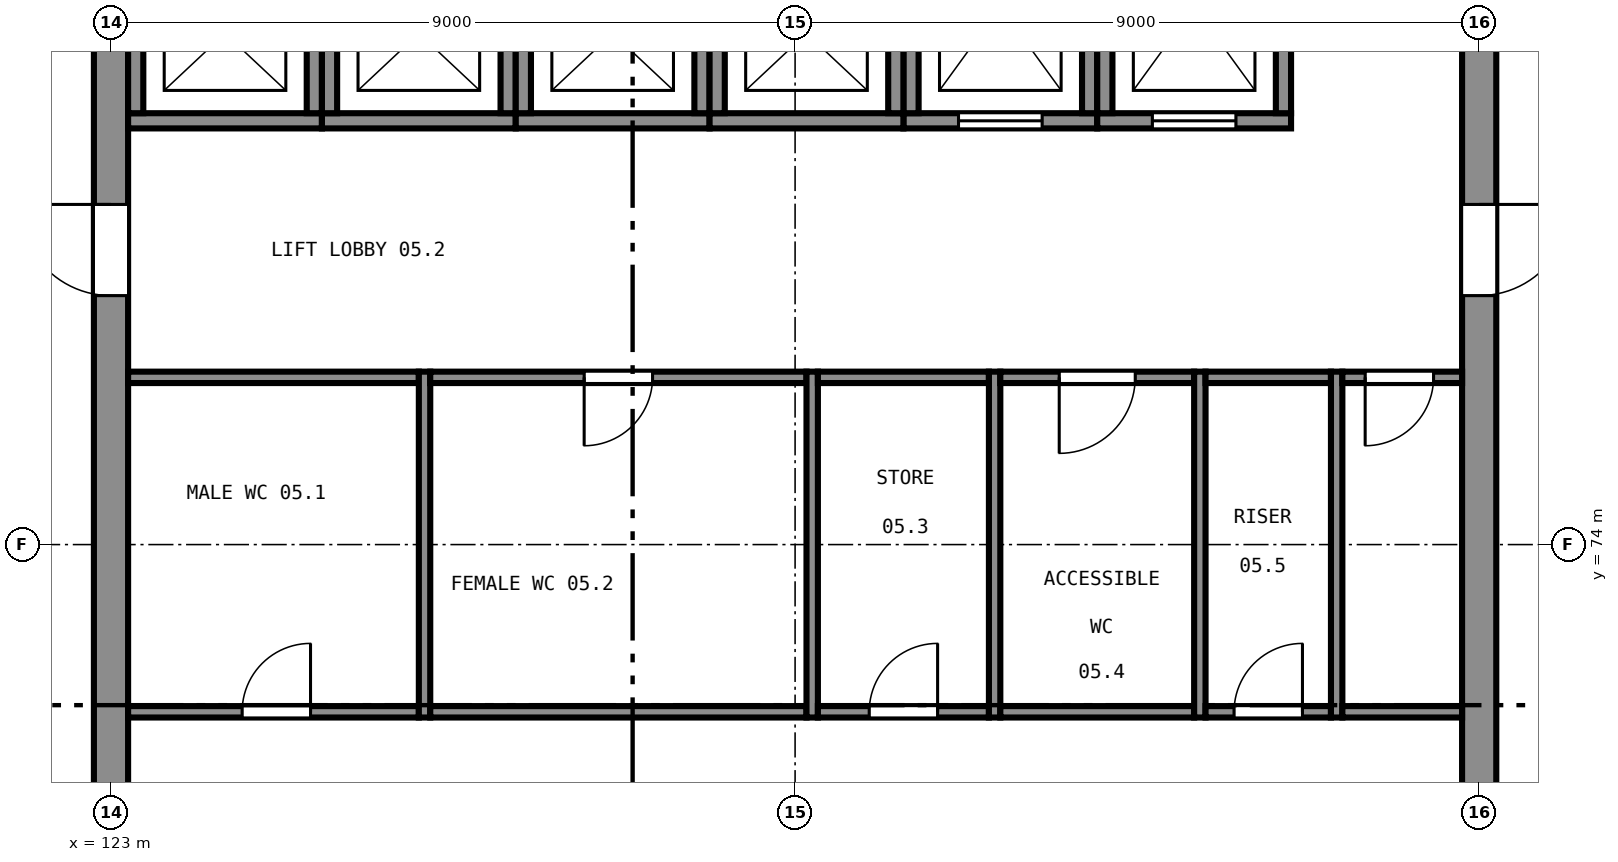
"""IFC4 building model, lengths in metres.
Left out: names, types, materials, properties, quantities, classifications, styles, units other than length and angle.
Written with IfcOpenShell. Run it as: python <this file> out.ifc"""

import sys

from ifc_helpers import new_model, si_unit, direction, frame, frame_2d, origin, place, context, subcontext, project, spatial, rectangle, extrude, element, fill, save


model = new_model("IFC4")
c1 = context("Model", 3, precision=1e-05, world=origin(), true_north=direction((0.0, 1.0)))
c2 = subcontext(c1, "Body", "Model", "MODEL_VIEW")
j1 = project(units=[si_unit("LENGTHUNIT", "METRE"), si_unit("PLANEANGLEUNIT", "RADIAN")], contexts=[c1])
p1 = place(None, origin())
s1 = spatial("IfcSite", under=j1, at=p1, CompositionType="ELEMENT")
p2 = place(p1, origin())
s2 = spatial("IfcBuilding", under=s1, at=p2, CompositionType="ELEMENT")
p3 = place(p2, frame((0.0, 0.0, 21.5)))
s3 = spatial("IfcBuildingStorey", under=s2, at=p3, CompositionType="ELEMENT", Elevation=21.5)
p4 = place(p3, frame((141.0, 65.225, 0.0), z_axis=(0.0, 0.0, 1.0), x_axis=(0.0, 1.0, 0.0)))
e1 = element("IfcWall", 1, at=p4, inside=s3, PredefinedType="SHEAR", context=c2, shape_type="SweptSolid", body=[
    extrude(rectangle(XDim=17.55, YDim=0.45, at=frame_2d((8.775, 0.0))), origin(), (0.0, 0.0, 1.0), 4.0),
])
p5 = place(p4, frame((4.3, 0.0, 0.0)))
e2 = element("IfcOpeningElement", 2, at=p5, cuts=e1, PredefinedType="OPENING", context=c2, shape_type="SweptSolid", body=[
    extrude(rectangle(XDim=1.2, YDim=2.1, at=frame_2d((0.6, 1.05))), frame((0.0, 0.235, 0.0), z_axis=(0.0, -1.0, 0.0), x_axis=(1.0, 0.0, 0.0)), (0.0, 0.0, 1.0), 0.47),
])
p6 = place(p4, frame((12.05, 0.0, 0.0)))
e3 = element("IfcOpeningElement", 3, at=p6, cuts=e1, PredefinedType="OPENING", context=c2, shape_type="SweptSolid", body=[
    extrude(rectangle(XDim=1.2, YDim=2.1, at=frame_2d((0.6, 1.05))), frame((0.0, 0.235, 0.0), z_axis=(0.0, -1.0, 0.0), x_axis=(1.0, 0.0, 0.0)), (0.0, 0.0, 1.0), 0.47),
])
p7 = place(p3, frame((123.0, 82.775, 0.0), z_axis=(0.0, 0.0, 1.0), x_axis=(0.0, -1.0, 0.0)))
e4 = element("IfcWall", 4, at=p7, inside=s3, PredefinedType="SHEAR", context=c2, shape_type="SweptSolid", body=[
    extrude(rectangle(XDim=17.55, YDim=0.45, at=frame_2d((8.775, 0.0))), origin(), (0.0, 0.0, 1.0), 4.0),
])
p8 = place(p7, frame((12.05, 0.0, 0.0)))
e5 = element("IfcOpeningElement", 5, at=p8, cuts=e4, PredefinedType="OPENING", context=c2, shape_type="SweptSolid", body=[
    extrude(rectangle(XDim=1.2, YDim=2.1, at=frame_2d((0.6, 1.05))), frame((0.0, 0.235, 0.0), z_axis=(0.0, -1.0, 0.0), x_axis=(1.0, 0.0, 0.0)), (0.0, 0.0, 1.0), 0.47),
])
p9 = place(p7, frame((4.3, 0.0, 0.0)))
e6 = element("IfcOpeningElement", 6, at=p9, cuts=e4, PredefinedType="OPENING", context=c2, shape_type="SweptSolid", body=[
    extrude(rectangle(XDim=1.2, YDim=2.1, at=frame_2d((0.6, 1.05))), frame((0.0, 0.235, 0.0), z_axis=(0.0, -1.0, 0.0), x_axis=(1.0, 0.0, 0.0)), (0.0, 0.0, 1.0), 0.47),
])
p10 = place(p3, frame((123.225, 79.575, 0.0), z_axis=(0.0, 0.0, 1.0), x_axis=(1.0, 0.0, 0.0)))
e7 = element("IfcWall", 7, at=p10, inside=s3, PredefinedType="SHEAR", context=c2, shape_type="SweptSolid", body=[
    extrude(rectangle(XDim=2.55, YDim=0.2, at=frame_2d((1.275, 0.0))), origin(), (0.0, 0.0, 1.0), 4.0),
])
for number, where, z_axis, x_axis in (
    (8, (125.675, 79.675, 0.0), (0.0, 0.0, 1.0), (0.0, 1.0, 0.0)),
    (9, (123.325, 81.775, 0.0), (0.0, 0.0, 1.0), (0.0, -1.0, 0.0)),
):
    element("IfcWall", number, at=place(p3, frame(where, z_axis=z_axis, x_axis=x_axis)), inside=s3, PredefinedType="SHEAR", context=c2, shape_type="SweptSolid", body=[
        extrude(rectangle(XDim=2.1, YDim=0.2, at=frame_2d((1.05, 0.0))), origin(), (0.0, 0.0, 1.0), 4.0),
    ])
p11 = place(p3, frame((125.775, 79.575, 0.0), z_axis=(0.0, 0.0, 1.0), x_axis=(1.0, 0.0, 0.0)))
e10 = element("IfcWall", 10, at=p11, inside=s3, PredefinedType="SHEAR", context=c2, shape_type="SweptSolid", body=[
    extrude(rectangle(XDim=2.55, YDim=0.2, at=frame_2d((1.275, 0.0))), origin(), (0.0, 0.0, 1.0), 4.0),
])
for number, where, z_axis, x_axis in (
    (11, (128.225, 79.675, 0.0), (0.0, 0.0, 1.0), (0.0, 1.0, 0.0)),
    (12, (125.875, 81.775, 0.0), (0.0, 0.0, 1.0), (0.0, -1.0, 0.0)),
):
    element("IfcWall", number, at=place(p3, frame(where, z_axis=z_axis, x_axis=x_axis)), inside=s3, PredefinedType="SHEAR", context=c2, shape_type="SweptSolid", body=[
        extrude(rectangle(XDim=2.1, YDim=0.2, at=frame_2d((1.05, 0.0))), origin(), (0.0, 0.0, 1.0), 4.0),
    ])
p12 = place(p3, frame((128.325, 79.575, 0.0), z_axis=(0.0, 0.0, 1.0), x_axis=(1.0, 0.0, 0.0)))
e13 = element("IfcWall", 13, at=p12, inside=s3, PredefinedType="SHEAR", context=c2, shape_type="SweptSolid", body=[
    extrude(rectangle(XDim=2.55, YDim=0.2, at=frame_2d((1.275, 0.0))), origin(), (0.0, 0.0, 1.0), 4.0),
])
for number, where, z_axis, x_axis in (
    (14, (130.775, 79.675, 0.0), (0.0, 0.0, 1.0), (0.0, 1.0, 0.0)),
    (15, (128.425, 81.775, 0.0), (0.0, 0.0, 1.0), (0.0, -1.0, 0.0)),
):
    element("IfcWall", number, at=place(p3, frame(where, z_axis=z_axis, x_axis=x_axis)), inside=s3, PredefinedType="SHEAR", context=c2, shape_type="SweptSolid", body=[
        extrude(rectangle(XDim=2.1, YDim=0.2, at=frame_2d((1.05, 0.0))), origin(), (0.0, 0.0, 1.0), 4.0),
    ])
p13 = place(p3, frame((130.875, 79.575, 0.0), z_axis=(0.0, 0.0, 1.0), x_axis=(1.0, 0.0, 0.0)))
e16 = element("IfcWall", 16, at=p13, inside=s3, PredefinedType="SHEAR", context=c2, shape_type="SweptSolid", body=[
    extrude(rectangle(XDim=2.55, YDim=0.2, at=frame_2d((1.275, 0.0))), origin(), (0.0, 0.0, 1.0), 4.0),
])
for number, where, z_axis, x_axis in (
    (17, (133.325, 79.675, 0.0), (0.0, 0.0, 1.0), (0.0, 1.0, 0.0)),
    (18, (130.975, 81.775, 0.0), (0.0, 0.0, 1.0), (0.0, -1.0, 0.0)),
):
    element("IfcWall", number, at=place(p3, frame(where, z_axis=z_axis, x_axis=x_axis)), inside=s3, PredefinedType="SHEAR", context=c2, shape_type="SweptSolid", body=[
        extrude(rectangle(XDim=2.1, YDim=0.2, at=frame_2d((1.05, 0.0))), origin(), (0.0, 0.0, 1.0), 4.0),
    ])
p14 = place(p3, frame((133.425, 79.575, 0.0), z_axis=(0.0, 0.0, 1.0), x_axis=(1.0, 0.0, 0.0)))
e19 = element("IfcWall", 19, at=p14, inside=s3, PredefinedType="SHEAR", context=c2, shape_type="SweptSolid", body=[
    extrude(rectangle(XDim=2.55, YDim=0.2, at=frame_2d((1.275, 0.0))), origin(), (0.0, 0.0, 1.0), 4.0),
])
p15 = place(p14, frame((0.725, 0.0, 0.0)))
e20 = element("IfcOpeningElement", 20, at=p15, cuts=e19, PredefinedType="OPENING", context=c2, shape_type="SweptSolid", body=[
    extrude(rectangle(XDim=1.1, YDim=2.1, at=frame_2d((0.55, 1.05))), frame((0.0, 0.11, 0.0), z_axis=(0.0, -1.0, 0.0), x_axis=(1.0, 0.0, 0.0)), (0.0, 0.0, 1.0), 0.22),
])
for number, where, z_axis, x_axis in (
    (21, (135.875, 79.675, 0.0), (0.0, 0.0, 1.0), (0.0, 1.0, 0.0)),
    (22, (133.525, 82.475, 0.0), (0.0, 0.0, 1.0), (0.0, -1.0, 0.0)),
):
    element("IfcWall", number, at=place(p3, frame(where, z_axis=z_axis, x_axis=x_axis)), inside=s3, PredefinedType="SHEAR", context=c2, shape_type="SweptSolid", body=[
        extrude(rectangle(XDim=2.8, YDim=0.2, at=frame_2d((1.4, 0.0))), origin(), (0.0, 0.0, 1.0), 4.0),
    ])
p16 = place(p3, frame((135.975, 79.575, 0.0), z_axis=(0.0, 0.0, 1.0), x_axis=(1.0, 0.0, 0.0)))
e23 = element("IfcWall", 23, at=p16, inside=s3, PredefinedType="SHEAR", context=c2, shape_type="SweptSolid", body=[
    extrude(rectangle(XDim=2.55, YDim=0.2, at=frame_2d((1.275, 0.0))), origin(), (0.0, 0.0, 1.0), 4.0),
])
p17 = place(p16, frame((0.725, 0.0, 0.0)))
e24 = element("IfcOpeningElement", 24, at=p17, cuts=e23, PredefinedType="OPENING", context=c2, shape_type="SweptSolid", body=[
    extrude(rectangle(XDim=1.1, YDim=2.1, at=frame_2d((0.55, 1.05))), frame((0.0, 0.11, 0.0), z_axis=(0.0, -1.0, 0.0), x_axis=(1.0, 0.0, 0.0)), (0.0, 0.0, 1.0), 0.22),
])
for number, where, z_axis, x_axis in (
    (25, (138.425, 79.675, 0.0), (0.0, 0.0, 1.0), (0.0, 1.0, 0.0)),
    (26, (136.075, 82.475, 0.0), (0.0, 0.0, 1.0), (0.0, -1.0, 0.0)),
):
    element("IfcWall", number, at=place(p3, frame(where, z_axis=z_axis, x_axis=x_axis)), inside=s3, PredefinedType="SHEAR", context=c2, shape_type="SweptSolid", body=[
        extrude(rectangle(XDim=2.8, YDim=0.2, at=frame_2d((1.4, 0.0))), origin(), (0.0, 0.0, 1.0), 4.0),
    ])
p18 = place(p3, frame((127.125, 71.725, 0.0), z_axis=(0.0, 0.0, 1.0), x_axis=(0.0, 1.0, 0.0)))
e27 = element("IfcWall", 27, at=p18, inside=s3, PredefinedType="PARTITIONING", context=c2, shape_type="SweptSolid", body=[
    extrude(rectangle(XDim=4.55, YDim=0.15, at=frame_2d((2.275, 0.0))), origin(), (0.0, 0.0, 1.0), 3.75),
])
p19 = place(p3, frame((123.225, 71.8, 0.0), z_axis=(0.0, 0.0, 1.0), x_axis=(1.0, 0.0, 0.0)))
e28 = element("IfcWall", 28, at=p19, inside=s3, PredefinedType="PARTITIONING", context=c2, shape_type="SweptSolid", body=[
    extrude(rectangle(XDim=3.825, YDim=0.15, at=frame_2d((1.913, 0.0))), origin(), (0.0, 0.0, 1.0), 3.75),
])
p20 = place(p19, frame((1.5, 0.0, 0.0)))
e29 = element("IfcOpeningElement", 29, at=p20, cuts=e28, PredefinedType="OPENING", context=c2, shape_type="SweptSolid", body=[
    extrude(rectangle(XDim=0.9, YDim=2.1, at=frame_2d((0.45, 1.05))), frame((0.0, 0.085, 0.0), z_axis=(0.0, -1.0, 0.0), x_axis=(1.0, 0.0, 0.0)), (0.0, 0.0, 1.0), 0.17),
])
p21 = place(p3, frame((123.225, 76.2, 0.0), z_axis=(0.0, 0.0, 1.0), x_axis=(1.0, 0.0, 0.0)))
e30 = element("IfcWall", 30, at=p21, inside=s3, PredefinedType="PARTITIONING", context=c2, shape_type="SweptSolid", body=[
    extrude(rectangle(XDim=3.825, YDim=0.15, at=frame_2d((1.913, 0.0))), origin(), (0.0, 0.0, 1.0), 3.75),
])
p22 = place(p3, frame((132.225, 71.725, 0.0), z_axis=(0.0, 0.0, 1.0), x_axis=(0.0, 1.0, 0.0)))
e31 = element("IfcWall", 31, at=p22, inside=s3, PredefinedType="PARTITIONING", context=c2, shape_type="SweptSolid", body=[
    extrude(rectangle(XDim=4.55, YDim=0.15, at=frame_2d((2.275, 0.0))), origin(), (0.0, 0.0, 1.0), 3.75),
])
p23 = place(p3, frame((127.2, 71.8, 0.0), z_axis=(0.0, 0.0, 1.0), x_axis=(1.0, 0.0, 0.0)))
e32 = element("IfcWall", 32, at=p23, inside=s3, PredefinedType="PARTITIONING", context=c2, shape_type="SweptSolid", body=[
    extrude(rectangle(XDim=4.95, YDim=0.15, at=frame_2d((2.475, 0.0))), origin(), (0.0, 0.0, 1.0), 3.75),
])
p24 = place(p3, frame((127.2, 76.2, 0.0), z_axis=(0.0, 0.0, 1.0), x_axis=(1.0, 0.0, 0.0)))
e33 = element("IfcWall", 33, at=p24, inside=s3, PredefinedType="PARTITIONING", context=c2, shape_type="SweptSolid", body=[
    extrude(rectangle(XDim=4.95, YDim=0.15, at=frame_2d((2.475, 0.0))), origin(), (0.0, 0.0, 1.0), 3.75),
])
p25 = place(p24, frame((2.025, 0.0, 0.0)))
e34 = element("IfcOpeningElement", 34, at=p25, cuts=e33, PredefinedType="OPENING", context=c2, shape_type="SweptSolid", body=[
    extrude(rectangle(XDim=0.9, YDim=2.1, at=frame_2d((0.45, 1.05))), frame((0.0, 0.085, 0.0), z_axis=(0.0, -1.0, 0.0), x_axis=(1.0, 0.0, 0.0)), (0.0, 0.0, 1.0), 0.17),
])
p26 = place(p3, frame((134.625, 71.725, 0.0), z_axis=(0.0, 0.0, 1.0), x_axis=(0.0, 1.0, 0.0)))
e35 = element("IfcWall", 35, at=p26, inside=s3, PredefinedType="PARTITIONING", context=c2, shape_type="SweptSolid", body=[
    extrude(rectangle(XDim=4.55, YDim=0.15, at=frame_2d((2.275, 0.0))), origin(), (0.0, 0.0, 1.0), 3.75),
])
p27 = place(p3, frame((132.3, 71.8, 0.0), z_axis=(0.0, 0.0, 1.0), x_axis=(1.0, 0.0, 0.0)))
e36 = element("IfcWall", 36, at=p27, inside=s3, PredefinedType="PARTITIONING", context=c2, shape_type="SweptSolid", body=[
    extrude(rectangle(XDim=2.25, YDim=0.15, at=frame_2d((1.125, 0.0))), origin(), (0.0, 0.0, 1.0), 3.75),
])
p28 = place(p27, frame((0.675, 0.0, 0.0)))
e37 = element("IfcOpeningElement", 37, at=p28, cuts=e36, PredefinedType="OPENING", context=c2, shape_type="SweptSolid", body=[
    extrude(rectangle(XDim=0.9, YDim=2.1, at=frame_2d((0.45, 1.05))), frame((0.0, 0.085, 0.0), z_axis=(0.0, -1.0, 0.0), x_axis=(1.0, 0.0, 0.0)), (0.0, 0.0, 1.0), 0.17),
])
p29 = place(p3, frame((132.3, 76.2, 0.0), z_axis=(0.0, 0.0, 1.0), x_axis=(1.0, 0.0, 0.0)))
e38 = element("IfcWall", 38, at=p29, inside=s3, PredefinedType="PARTITIONING", context=c2, shape_type="SweptSolid", body=[
    extrude(rectangle(XDim=2.25, YDim=0.15, at=frame_2d((1.125, 0.0))), origin(), (0.0, 0.0, 1.0), 3.75),
])
p30 = place(p3, frame((137.325, 71.725, 0.0), z_axis=(0.0, 0.0, 1.0), x_axis=(0.0, 1.0, 0.0)))
e39 = element("IfcWall", 39, at=p30, inside=s3, PredefinedType="PARTITIONING", context=c2, shape_type="SweptSolid", body=[
    extrude(rectangle(XDim=4.55, YDim=0.15, at=frame_2d((2.275, 0.0))), origin(), (0.0, 0.0, 1.0), 3.75),
])
p31 = place(p3, frame((134.7, 71.8, 0.0), z_axis=(0.0, 0.0, 1.0), x_axis=(1.0, 0.0, 0.0)))
e40 = element("IfcWall", 40, at=p31, inside=s3, PredefinedType="PARTITIONING", context=c2, shape_type="SweptSolid", body=[
    extrude(rectangle(XDim=2.55, YDim=0.15, at=frame_2d((1.275, 0.0))), origin(), (0.0, 0.0, 1.0), 3.75),
])
p32 = place(p3, frame((134.7, 76.2, 0.0), z_axis=(0.0, 0.0, 1.0), x_axis=(1.0, 0.0, 0.0)))
e41 = element("IfcWall", 41, at=p32, inside=s3, PredefinedType="PARTITIONING", context=c2, shape_type="SweptSolid", body=[
    extrude(rectangle(XDim=2.55, YDim=0.15, at=frame_2d((1.275, 0.0))), origin(), (0.0, 0.0, 1.0), 3.75),
])
p33 = place(p32, frame((0.775, 0.0, 0.0)))
e42 = element("IfcOpeningElement", 42, at=p33, cuts=e41, PredefinedType="OPENING", context=c2, shape_type="SweptSolid", body=[
    extrude(rectangle(XDim=1.0, YDim=2.1, at=frame_2d((0.5, 1.05))), frame((0.0, 0.085, 0.0), z_axis=(0.0, -1.0, 0.0), x_axis=(1.0, 0.0, 0.0)), (0.0, 0.0, 1.0), 0.17),
])
p34 = place(p3, frame((139.125, 71.725, 0.0), z_axis=(0.0, 0.0, 1.0), x_axis=(0.0, 1.0, 0.0)))
e43 = element("IfcWall", 43, at=p34, inside=s3, PredefinedType="PARTITIONING", context=c2, shape_type="SweptSolid", body=[
    extrude(rectangle(XDim=4.55, YDim=0.15, at=frame_2d((2.275, 0.0))), origin(), (0.0, 0.0, 1.0), 3.75),
])
p35 = place(p3, frame((137.4, 71.8, 0.0), z_axis=(0.0, 0.0, 1.0), x_axis=(1.0, 0.0, 0.0)))
e44 = element("IfcWall", 44, at=p35, inside=s3, PredefinedType="PARTITIONING", context=c2, shape_type="SweptSolid", body=[
    extrude(rectangle(XDim=1.65, YDim=0.15, at=frame_2d((0.825, 0.0))), origin(), (0.0, 0.0, 1.0), 3.75),
])
p36 = place(p35, frame((0.375, 0.0, 0.0)))
e45 = element("IfcOpeningElement", 45, at=p36, cuts=e44, PredefinedType="OPENING", context=c2, shape_type="SweptSolid", body=[
    extrude(rectangle(XDim=0.9, YDim=2.1, at=frame_2d((0.45, 1.05))), frame((0.0, 0.085, 0.0), z_axis=(0.0, -1.0, 0.0), x_axis=(1.0, 0.0, 0.0)), (0.0, 0.0, 1.0), 0.17),
])
p37 = place(p3, frame((137.4, 76.2, 0.0), z_axis=(0.0, 0.0, 1.0), x_axis=(1.0, 0.0, 0.0)))
e46 = element("IfcWall", 46, at=p37, inside=s3, PredefinedType="PARTITIONING", context=c2, shape_type="SweptSolid", body=[
    extrude(rectangle(XDim=1.65, YDim=0.15, at=frame_2d((0.825, 0.0))), origin(), (0.0, 0.0, 1.0), 3.75),
])
p38 = place(p3, frame((139.2, 71.8, 0.0), z_axis=(0.0, 0.0, 1.0), x_axis=(1.0, 0.0, 0.0)))
e47 = element("IfcWall", 47, at=p38, inside=s3, PredefinedType="PARTITIONING", context=c2, shape_type="SweptSolid", body=[
    extrude(rectangle(XDim=1.575, YDim=0.15, at=frame_2d((0.788, 0.0))), origin(), (0.0, 0.0, 1.0), 3.75),
])
p39 = place(p3, frame((139.2, 76.2, 0.0), z_axis=(0.0, 0.0, 1.0), x_axis=(1.0, 0.0, 0.0)))
e48 = element("IfcWall", 48, at=p39, inside=s3, PredefinedType="PARTITIONING", context=c2, shape_type="SweptSolid", body=[
    extrude(rectangle(XDim=1.575, YDim=0.15, at=frame_2d((0.788, 0.0))), origin(), (0.0, 0.0, 1.0), 3.75),
])
p40 = place(p39, frame((0.3, 0.0, 0.0)))
e49 = element("IfcOpeningElement", 49, at=p40, cuts=e48, PredefinedType="OPENING", context=c2, shape_type="SweptSolid", body=[
    extrude(rectangle(XDim=0.9, YDim=2.1, at=frame_2d((0.45, 1.05))), frame((0.0, 0.085, 0.0), z_axis=(0.0, -1.0, 0.0), x_axis=(1.0, 0.0, 0.0)), (0.0, 0.0, 1.0), 0.17),
])
p41 = place(p15, origin())
e50 = element("IfcDoor", 50, at=p41, inside=s3, OperationType="SLIDING_TO_LEFT", PredefinedType="DOOR", context=c2, shape_type="SweptSolid", body=[
    extrude(rectangle(XDim=1.1, YDim=2.1, at=frame_2d((0.55, 1.05))), frame((0.0, 0.025, 0.0), z_axis=(0.0, -1.0, 0.0), x_axis=(1.0, 0.0, 0.0)), (0.0, 0.0, 1.0), 0.05),
])
fill(e20, e50)
p42 = place(p17, origin())
e51 = element("IfcDoor", 51, at=p42, inside=s3, OperationType="SLIDING_TO_LEFT", PredefinedType="DOOR", context=c2, shape_type="SweptSolid", body=[
    extrude(rectangle(XDim=1.1, YDim=2.1, at=frame_2d((0.55, 1.05))), frame((0.0, 0.025, 0.0), z_axis=(0.0, -1.0, 0.0), x_axis=(1.0, 0.0, 0.0)), (0.0, 0.0, 1.0), 0.05),
])
fill(e24, e51)
p43 = place(p9, frame((1.2, 0.0, 0.0), z_axis=(0.0, 0.0, 1.0), x_axis=(-1.0, 0.0, 0.0)))
e52 = element("IfcDoor", 52, at=p43, inside=s3, OperationType="SINGLE_SWING_LEFT", PredefinedType="DOOR", context=c2, shape_type="SweptSolid", body=[
    extrude(rectangle(XDim=1.2, YDim=2.1, at=frame_2d((0.6, 1.05))), frame((0.0, 0.025, 0.0), z_axis=(0.0, -1.0, 0.0), x_axis=(1.0, 0.0, 0.0)), (0.0, 0.0, 1.0), 0.05),
])
fill(e6, e52)
p44 = place(p6, frame((1.2, 0.0, 0.0), z_axis=(0.0, 0.0, 1.0), x_axis=(-1.0, 0.0, 0.0)))
e53 = element("IfcDoor", 53, at=p44, inside=s3, OperationType="SINGLE_SWING_RIGHT", PredefinedType="DOOR", context=c2, shape_type="SweptSolid", body=[
    extrude(rectangle(XDim=1.2, YDim=2.1, at=frame_2d((0.6, 1.05))), frame((0.0, 0.025, 0.0), z_axis=(0.0, -1.0, 0.0), x_axis=(1.0, 0.0, 0.0)), (0.0, 0.0, 1.0), 0.05),
])
fill(e3, e53)
p45 = place(p20, origin())
e54 = element("IfcDoor", 54, at=p45, inside=s3, OperationType="SINGLE_SWING_LEFT", PredefinedType="DOOR", context=c2, shape_type="SweptSolid", body=[
    extrude(rectangle(XDim=0.9, YDim=2.1, at=frame_2d((0.45, 1.05))), frame((0.0, 0.025, 0.0), z_axis=(0.0, -1.0, 0.0), x_axis=(1.0, 0.0, 0.0)), (0.0, 0.0, 1.0), 0.05),
])
fill(e29, e54)
p46 = place(p25, frame((0.9, 0.0, 0.0), z_axis=(0.0, 0.0, 1.0), x_axis=(-1.0, 0.0, 0.0)))
e55 = element("IfcDoor", 55, at=p46, inside=s3, OperationType="SINGLE_SWING_LEFT", PredefinedType="DOOR", context=c2, shape_type="SweptSolid", body=[
    extrude(rectangle(XDim=0.9, YDim=2.1, at=frame_2d((0.45, 1.05))), frame((0.0, 0.025, 0.0), z_axis=(0.0, -1.0, 0.0), x_axis=(1.0, 0.0, 0.0)), (0.0, 0.0, 1.0), 0.05),
])
fill(e34, e55)
p47 = place(p28, origin())
e56 = element("IfcDoor", 56, at=p47, inside=s3, OperationType="SINGLE_SWING_LEFT", PredefinedType="DOOR", context=c2, shape_type="SweptSolid", body=[
    extrude(rectangle(XDim=0.9, YDim=2.1, at=frame_2d((0.45, 1.05))), frame((0.0, 0.025, 0.0), z_axis=(0.0, -1.0, 0.0), x_axis=(1.0, 0.0, 0.0)), (0.0, 0.0, 1.0), 0.05),
])
fill(e37, e56)
p48 = place(p33, frame((1.0, 0.0, 0.0), z_axis=(0.0, 0.0, 1.0), x_axis=(-1.0, 0.0, 0.0)))
e57 = element("IfcDoor", 57, at=p48, inside=s3, OperationType="SINGLE_SWING_LEFT", PredefinedType="DOOR", context=c2, shape_type="SweptSolid", body=[
    extrude(rectangle(XDim=1.0, YDim=2.1, at=frame_2d((0.5, 1.05))), frame((0.0, 0.025, 0.0), z_axis=(0.0, -1.0, 0.0), x_axis=(1.0, 0.0, 0.0)), (0.0, 0.0, 1.0), 0.05),
])
fill(e42, e57)
p49 = place(p36, origin())
e58 = element("IfcDoor", 58, at=p49, inside=s3, OperationType="SINGLE_SWING_LEFT", PredefinedType="DOOR", context=c2, shape_type="SweptSolid", body=[
    extrude(rectangle(XDim=0.9, YDim=2.1, at=frame_2d((0.45, 1.05))), frame((0.0, 0.025, 0.0), z_axis=(0.0, -1.0, 0.0), x_axis=(1.0, 0.0, 0.0)), (0.0, 0.0, 1.0), 0.05),
])
fill(e45, e58)
p50 = place(p40, frame((0.9, 0.0, 0.0), z_axis=(0.0, 0.0, 1.0), x_axis=(-1.0, 0.0, 0.0)))
e59 = element("IfcDoor", 59, at=p50, inside=s3, OperationType="SINGLE_SWING_LEFT", PredefinedType="DOOR", context=c2, shape_type="SweptSolid", body=[
    extrude(rectangle(XDim=0.9, YDim=2.1, at=frame_2d((0.45, 1.05))), frame((0.0, 0.025, 0.0), z_axis=(0.0, -1.0, 0.0), x_axis=(1.0, 0.0, 0.0)), (0.0, 0.0, 1.0), 0.05),
])
fill(e49, e59)
save(model, sys.argv[1])
